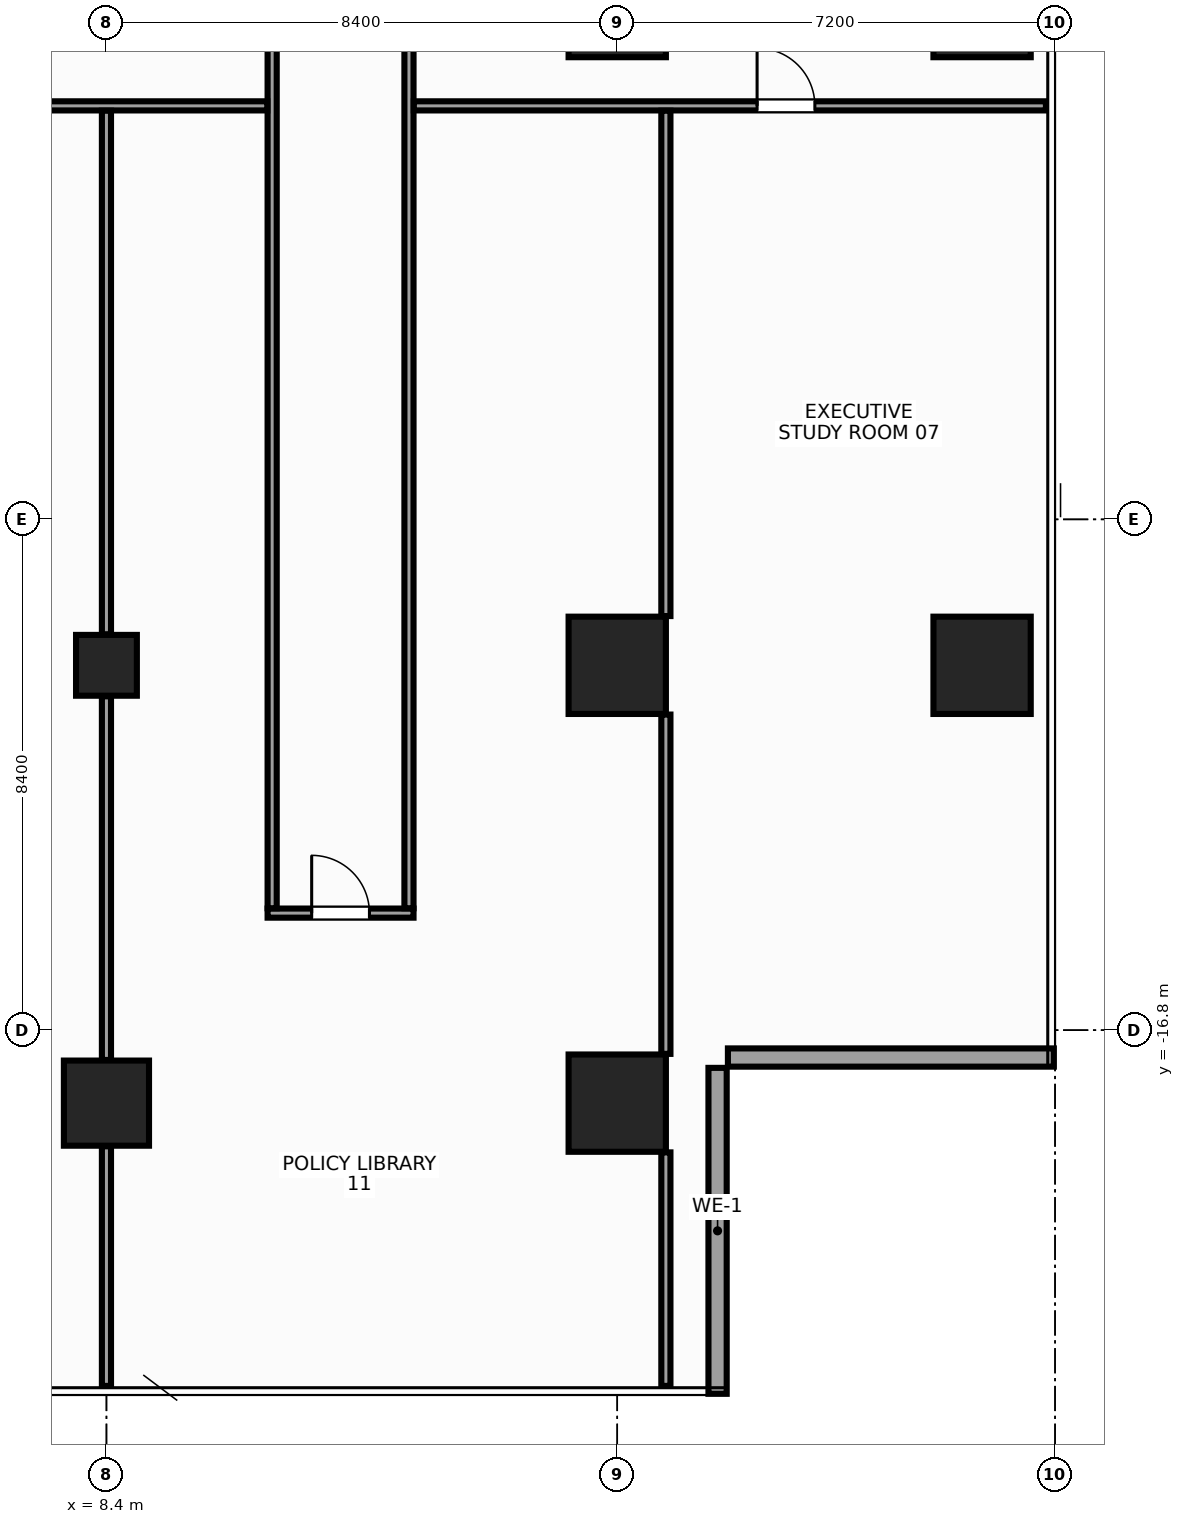
"""IFC4 building model, lengths in metres.
Left out: names, types, materials, properties, quantities, classifications, styles, units other than length and angle.
Written with IfcOpenShell. Run it as: python <this file> out.ifc"""

import sys

from ifc_helpers import new_model, si_unit, direction, frame, frame_2d, origin, origin_2d, place, context, subcontext, project, spatial, rectangle, hollow_rectangle, extrude, source, transform, mapped, element, fill, save


model = new_model("IFC4")
c1 = context("Model", 3, precision=1e-05, world=origin(), true_north=direction((0.0, 1.0)))
c2 = subcontext(c1, "Body", "Model", "MODEL_VIEW")
j1 = project(units=[si_unit("LENGTHUNIT", "METRE"), si_unit("PLANEANGLEUNIT", "RADIAN")], contexts=[c1])
p1 = place(None, origin())
s1 = spatial("IfcSite", under=j1, at=p1, CompositionType="ELEMENT")
p2 = place(p1, origin())
s2 = spatial("IfcBuilding", under=s1, at=p2, CompositionType="ELEMENT")
p3 = place(p2, frame((0.0, 0.0, 153.2)))
s3 = spatial("IfcBuildingStorey", under=s2, at=p3, CompositionType="ELEMENT", Elevation=153.2)
m1 = source(origin(), c2, "Body", "SweptSolid", [
    extrude(rectangle(XDim=1.6, YDim=1.6, at=origin_2d()), origin(), (0.0, 0.0, 1.0), 3.6),
])
for number, where, z_axis, x_axis in (
    (1, (16.8, -18.0, 0.0), (0.0, 0.0, 1.0), (1.0, 0.0, 0.0)),
    (2, (16.8, -10.8, 0.0), (0.0, 0.0, 1.0), (1.0, 0.0, 0.0)),
    (3, (16.8, 0.0, 0.0), (0.0, 0.0, 1.0), (1.0, 0.0, 0.0)),
    (4, (22.8, -10.8, 0.0), (0.0, 0.0, 1.0), (1.0, 0.0, 0.0)),
    (5, (22.8, 0.0, 0.0), (0.0, 0.0, 1.0), (1.0, 0.0, 0.0)),
):
    element("IfcColumn", number, at=place(p3, frame(where, z_axis=z_axis, x_axis=x_axis)), inside=s3, PredefinedType="COLUMN", context=c2, shape_type="MappedRepresentation", body=[
        mapped(m1, transform((0.0, 0.0, 0.0), x_axis=(1.0, 0.0, 0.0), y_axis=(0.0, 1.0, 0.0), z_axis=(0.0, 0.0, 1.0), scale=1.0)),
    ])
m2 = source(origin(), c2, "Body", "SweptSolid", [
    extrude(rectangle(XDim=1.4, YDim=1.4, at=origin_2d()), origin(), (0.0, 0.0, 1.0), 3.6),
])
p4 = place(p3, frame((8.4, -18.0, 0.0), z_axis=(0.0, 0.0, 1.0), x_axis=(1.0, 0.0, 0.0)))
e6 = element("IfcColumn", 6, at=p4, inside=s3, PredefinedType="COLUMN", context=c2, shape_type="MappedRepresentation", body=[
    mapped(m2, transform((0.0, 0.0, 0.0), x_axis=(1.0, 0.0, 0.0), y_axis=(0.0, 1.0, 0.0), z_axis=(0.0, 0.0, 1.0), scale=1.0)),
])
m3 = source(origin(), c2, "Body", "SweptSolid", [
    extrude(hollow_rectangle(XDim=1.0, YDim=1.0, WallThickness=0.045, at=origin_2d()), origin(), (0.0, 0.0, 1.0), 3.6),
])
p5 = place(p3, frame((8.4, -10.8, 0.0), z_axis=(0.0, 0.0, 1.0), x_axis=(1.0, 0.0, 0.0)))
e7 = element("IfcColumn", 7, at=p5, inside=s3, PredefinedType="COLUMN", context=c2, shape_type="MappedRepresentation", body=[
    mapped(m3, transform((0.0, 0.0, 0.0), x_axis=(1.0, 0.0, 0.0), y_axis=(0.0, 1.0, 0.0), z_axis=(0.0, 0.0, 1.0), scale=1.0)),
])
m4 = source(origin(), c2, "Body", "SweptSolid", [
    extrude(rectangle(XDim=5.36, YDim=0.3, at=frame_2d((2.68, 0.0))), origin(), (0.0, 0.0, 1.0), 2.76),
])
p6 = place(p3, frame((18.45, -22.78, 0.0), z_axis=(0.0, 0.0, 1.0), x_axis=(0.0, 1.0, 0.0)))
e8 = element("IfcWall", 8, at=p6, inside=s3, PredefinedType="STANDARD", context=c2, shape_type="MappedRepresentation", body=[
    mapped(m4, transform((0.0, 0.0, 0.0), x_axis=(1.0, 0.0, 0.0), y_axis=(0.0, 1.0, 0.0), z_axis=(0.0, 0.0, 1.0), scale=1.0)),
])
m5 = source(origin(), c2, "Body", "SweptSolid", [
    extrude(rectangle(XDim=5.36, YDim=0.3, at=frame_2d((2.68, 0.0))), origin(), (0.0, 0.0, 1.0), 2.76),
])
p7 = place(p3, frame((18.62, -17.25, 0.0), z_axis=(0.0, 0.0, 1.0), x_axis=(1.0, 0.0, 0.0)))
e9 = element("IfcWall", 9, at=p7, inside=s3, PredefinedType="STANDARD", context=c2, shape_type="MappedRepresentation", body=[
    mapped(m5, transform((0.0, 0.0, 0.0), x_axis=(1.0, 0.0, 0.0), y_axis=(0.0, 1.0, 0.0), z_axis=(0.0, 0.0, 1.0), scale=1.0)),
])
m6 = source(origin(), c2, "Body", "SweptSolid", [
    extrude(rectangle(XDim=2.4, YDim=0.15, at=frame_2d((1.2, 0.0))), origin(), (0.0, 0.0, 1.0), 3.38),
])
p8 = place(p3, frame((11.05, -14.875, 0.0), z_axis=(0.0, 0.0, 1.0), x_axis=(1.0, 0.0, 0.0)))
e10 = element("IfcWall", 10, at=p8, inside=s3, PredefinedType="PARTITIONING", context=c2, shape_type="MappedRepresentation", body=[
    mapped(m6, transform((0.0, 0.0, 0.0), x_axis=(1.0, 0.0, 0.0), y_axis=(0.0, 1.0, 0.0), z_axis=(0.0, 0.0, 1.0), scale=1.0)),
])
p9 = place(p8, frame((0.725, 0.0, 0.0)))
e11 = element("IfcOpeningElement", 11, at=p9, cuts=e10, PredefinedType="OPENING", context=c2, shape_type="SweptSolid", body=[
    extrude(rectangle(XDim=0.95, YDim=2.15, at=frame_2d((0.475, 1.075))), frame((0.0, 0.087, 0.0), z_axis=(0.0, -1.0, 0.0), x_axis=(1.0, 0.0, 0.0)), (0.0, 0.0, 1.0), 0.174),
])
m7 = source(origin(), c2, "Body", "SweptSolid", [
    extrude(rectangle(XDim=22.595, YDim=0.15, at=frame_2d((11.297, 0.0))), origin(), (0.0, 0.0, 1.0), 2.665),
])
for number, where, z_axis, x_axis in (
    (12, (11.125, -14.795, 0.0), (0.0, 0.0, 1.0), (0.0, 1.0, 0.0)),
    (13, (13.375, -14.795, 0.0), (0.0, 0.0, 1.0), (0.0, 1.0, 0.0)),
):
    element("IfcWall", number, at=place(p3, frame(where, z_axis=z_axis, x_axis=x_axis)), inside=s3, PredefinedType="PARTITIONING", context=c2, shape_type="MappedRepresentation", body=[
        mapped(m7, transform((0.0, 0.0, 0.0), x_axis=(1.0, 0.0, 0.0), y_axis=(0.0, 1.0, 0.0), z_axis=(0.0, 0.0, 1.0), scale=1.0)),
    ])
m8 = source(origin(), c2, "Body", "SweptSolid", [
    extrude(rectangle(XDim=34.895, YDim=0.15, at=frame_2d((17.448, 0.0))), origin(), (0.0, 0.0, 1.0), 2.765),
])
p10 = place(p3, frame((-23.85, -1.6, 0.0), z_axis=(0.0, 0.0, 1.0), x_axis=(1.0, 0.0, 0.0)))
e14 = element("IfcWall", 14, at=p10, inside=s3, PredefinedType="PARTITIONING", context=c2, shape_type="MappedRepresentation", body=[
    mapped(m8, transform((0.0, 0.0, 0.0), x_axis=(1.0, 0.0, 0.0), y_axis=(0.0, 1.0, 0.0), z_axis=(0.0, 0.0, 1.0), scale=1.0)),
])
p11 = place(p10, frame((3.913, 0.0, 0.0)))
e15 = element("IfcOpeningElement", 15, at=p11, cuts=e14, PredefinedType="OPENING", context=c2, shape_type="SweptSolid", body=[
    extrude(rectangle(XDim=0.95, YDim=2.15, at=frame_2d((0.475, 1.075))), frame((0.0, 0.087, 0.0), z_axis=(0.0, -1.0, 0.0), x_axis=(1.0, 0.0, 0.0)), (0.0, 0.0, 1.0), 0.174),
])
p12 = place(p10, frame((9.675, 0.0, 0.0)))
e16 = element("IfcOpeningElement", 16, at=p12, cuts=e14, PredefinedType="OPENING", context=c2, shape_type="SweptSolid", body=[
    extrude(rectangle(XDim=0.95, YDim=2.15, at=frame_2d((0.475, 1.075))), frame((0.0, 0.087, 0.0), z_axis=(0.0, -1.0, 0.0), x_axis=(1.0, 0.0, 0.0)), (0.0, 0.0, 1.0), 0.174),
])
p13 = place(p10, frame((19.175, 0.0, 0.0)))
e17 = element("IfcOpeningElement", 17, at=p13, cuts=e14, PredefinedType="OPENING", context=c2, shape_type="SweptSolid", body=[
    extrude(rectangle(XDim=0.95, YDim=2.15, at=frame_2d((0.475, 1.075))), frame((0.0, 0.087, 0.0), z_axis=(0.0, -1.0, 0.0), x_axis=(1.0, 0.0, 0.0)), (0.0, 0.0, 1.0), 0.174),
])
p14 = place(p10, frame((28.275, 0.0, 0.0)))
e18 = element("IfcOpeningElement", 18, at=p14, cuts=e14, PredefinedType="OPENING", context=c2, shape_type="SweptSolid", body=[
    extrude(rectangle(XDim=0.95, YDim=2.15, at=frame_2d((0.475, 1.075))), frame((0.0, 0.087, 0.0), z_axis=(0.0, -1.0, 0.0), x_axis=(1.0, 0.0, 0.0)), (0.0, 0.0, 1.0), 0.174),
])
m9 = source(origin(), c2, "Body", "SweptSolid", [
    extrude(rectangle(XDim=10.395, YDim=0.15, at=frame_2d((5.198, 0.0))), origin(), (0.0, 0.0, 1.0), 2.765),
])
p15 = place(p3, frame((13.455, -1.6, 0.0), z_axis=(0.0, 0.0, 1.0), x_axis=(1.0, 0.0, 0.0)))
e19 = element("IfcWall", 19, at=p15, inside=s3, PredefinedType="PARTITIONING", context=c2, shape_type="MappedRepresentation", body=[
    mapped(m9, transform((0.0, 0.0, 0.0), x_axis=(1.0, 0.0, 0.0), y_axis=(0.0, 1.0, 0.0), z_axis=(0.0, 0.0, 1.0), scale=1.0)),
])
p16 = place(p15, frame((5.645, 0.0, 0.0)))
e20 = element("IfcOpeningElement", 20, at=p16, cuts=e19, PredefinedType="OPENING", context=c2, shape_type="SweptSolid", body=[
    extrude(rectangle(XDim=0.95, YDim=2.15, at=frame_2d((0.475, 1.075))), frame((0.0, 0.087, 0.0), z_axis=(0.0, -1.0, 0.0), x_axis=(1.0, 0.0, 0.0)), (0.0, 0.0, 1.0), 0.174),
])
m10 = source(origin(), c2, "Body", "SweptSolid", [
    extrude(rectangle(XDim=3.94, YDim=0.15, at=frame_2d((1.97, 0.0))), origin(), (0.0, 0.0, 1.0), 3.38),
])
p17 = place(p3, frame((8.4, -22.65, 0.0), z_axis=(0.0, 0.0, 1.0), x_axis=(0.0, 1.0, 0.0)))
e21 = element("IfcWall", 21, at=p17, inside=s3, PredefinedType="PARTITIONING", context=c2, shape_type="MappedRepresentation", body=[
    mapped(m10, transform((0.0, 0.0, 0.0), x_axis=(1.0, 0.0, 0.0), y_axis=(0.0, 1.0, 0.0), z_axis=(0.0, 0.0, 1.0), scale=1.0)),
])
m11 = source(origin(), c2, "Body", "SweptSolid", [
    extrude(rectangle(XDim=5.98, YDim=0.15, at=frame_2d((2.99, 0.0))), origin(), (0.0, 0.0, 1.0), 2.965),
])
p18 = place(p3, frame((8.4, -17.29, 0.0), z_axis=(0.0, 0.0, 1.0), x_axis=(0.0, 1.0, 0.0)))
e22 = element("IfcWall", 22, at=p18, inside=s3, PredefinedType="PARTITIONING", context=c2, shape_type="MappedRepresentation", body=[
    mapped(m11, transform((0.0, 0.0, 0.0), x_axis=(1.0, 0.0, 0.0), y_axis=(0.0, 1.0, 0.0), z_axis=(0.0, 0.0, 1.0), scale=1.0)),
])
m12 = source(origin(), c2, "Body", "SweptSolid", [
    extrude(rectangle(XDim=8.61, YDim=0.15, at=frame_2d((4.305, 0.0))), origin(), (0.0, 0.0, 1.0), 2.765),
])
p19 = place(p3, frame((8.4, -10.29, 0.0), z_axis=(0.0, 0.0, 1.0), x_axis=(0.0, 1.0, 0.0)))
e23 = element("IfcWall", 23, at=p19, inside=s3, PredefinedType="PARTITIONING", context=c2, shape_type="MappedRepresentation", body=[
    mapped(m12, transform((0.0, 0.0, 0.0), x_axis=(1.0, 0.0, 0.0), y_axis=(0.0, 1.0, 0.0), z_axis=(0.0, 0.0, 1.0), scale=1.0)),
])
m13 = source(origin(), c2, "Body", "SweptSolid", [
    extrude(rectangle(XDim=3.84, YDim=0.15, at=frame_2d((1.92, 0.0))), origin(), (0.0, 0.0, 1.0), 3.38),
])
p20 = place(p3, frame((17.6, -22.65, 0.0), z_axis=(0.0, 0.0, 1.0), x_axis=(0.0, 1.0, 0.0)))
e24 = element("IfcWall", 24, at=p20, inside=s3, PredefinedType="PARTITIONING", context=c2, shape_type="MappedRepresentation", body=[
    mapped(m13, transform((0.0, 0.0, 0.0), x_axis=(1.0, 0.0, 0.0), y_axis=(0.0, 1.0, 0.0), z_axis=(0.0, 0.0, 1.0), scale=1.0)),
])
m14 = source(origin(), c2, "Body", "SweptSolid", [
    extrude(rectangle(XDim=5.58, YDim=0.15, at=frame_2d((2.79, 0.0))), origin(), (0.0, 0.0, 1.0), 3.38),
])
p21 = place(p3, frame((17.6, -17.19, 0.0), z_axis=(0.0, 0.0, 1.0), x_axis=(0.0, 1.0, 0.0)))
e25 = element("IfcWall", 25, at=p21, inside=s3, PredefinedType="PARTITIONING", context=c2, shape_type="MappedRepresentation", body=[
    mapped(m14, transform((0.0, 0.0, 0.0), x_axis=(1.0, 0.0, 0.0), y_axis=(0.0, 1.0, 0.0), z_axis=(0.0, 0.0, 1.0), scale=1.0)),
])
m15 = source(origin(), c2, "Body", "SweptSolid", [
    extrude(rectangle(XDim=8.31, YDim=0.15, at=frame_2d((4.155, 0.0))), origin(), (0.0, 0.0, 1.0), 3.38),
])
p22 = place(p3, frame((17.6, -9.99, 0.0), z_axis=(0.0, 0.0, 1.0), x_axis=(0.0, 1.0, 0.0)))
e26 = element("IfcWall", 26, at=p22, inside=s3, PredefinedType="PARTITIONING", context=c2, shape_type="MappedRepresentation", body=[
    mapped(m15, transform((0.0, 0.0, 0.0), x_axis=(1.0, 0.0, 0.0), y_axis=(0.0, 1.0, 0.0), z_axis=(0.0, 0.0, 1.0), scale=1.0)),
])
m16 = source(origin(), c2, "Body", "SweptSolid", [
    extrude(rectangle(XDim=0.95, YDim=2.15, at=frame_2d((0.475, 1.075))), frame((0.0, 0.025, 0.0), z_axis=(0.0, -1.0, 0.0), x_axis=(1.0, 0.0, 0.0)), (0.0, 0.0, 1.0), 0.05),
])
p23 = place(p9, origin())
e27 = element("IfcDoor", 27, at=p23, inside=s3, OperationType="SINGLE_SWING_LEFT", PredefinedType="DOOR", context=c2, shape_type="MappedRepresentation", body=[
    mapped(m16, transform((0.0, 0.0, 0.0), x_axis=(1.0, 0.0, 0.0), y_axis=(0.0, 1.0, 0.0), z_axis=(0.0, 0.0, 1.0), scale=1.0)),
])
fill(e11, e27)
p24 = place(p16, origin())
e28 = element("IfcDoor", 28, at=p24, inside=s3, OperationType="SINGLE_SWING_LEFT", PredefinedType="DOOR", context=c2, shape_type="MappedRepresentation", body=[
    mapped(m16, transform((0.0, 0.0, 0.0), x_axis=(1.0, 0.0, 0.0), y_axis=(0.0, 1.0, 0.0), z_axis=(0.0, 0.0, 1.0), scale=1.0)),
])
fill(e20, e28)
save(model, sys.argv[1])
